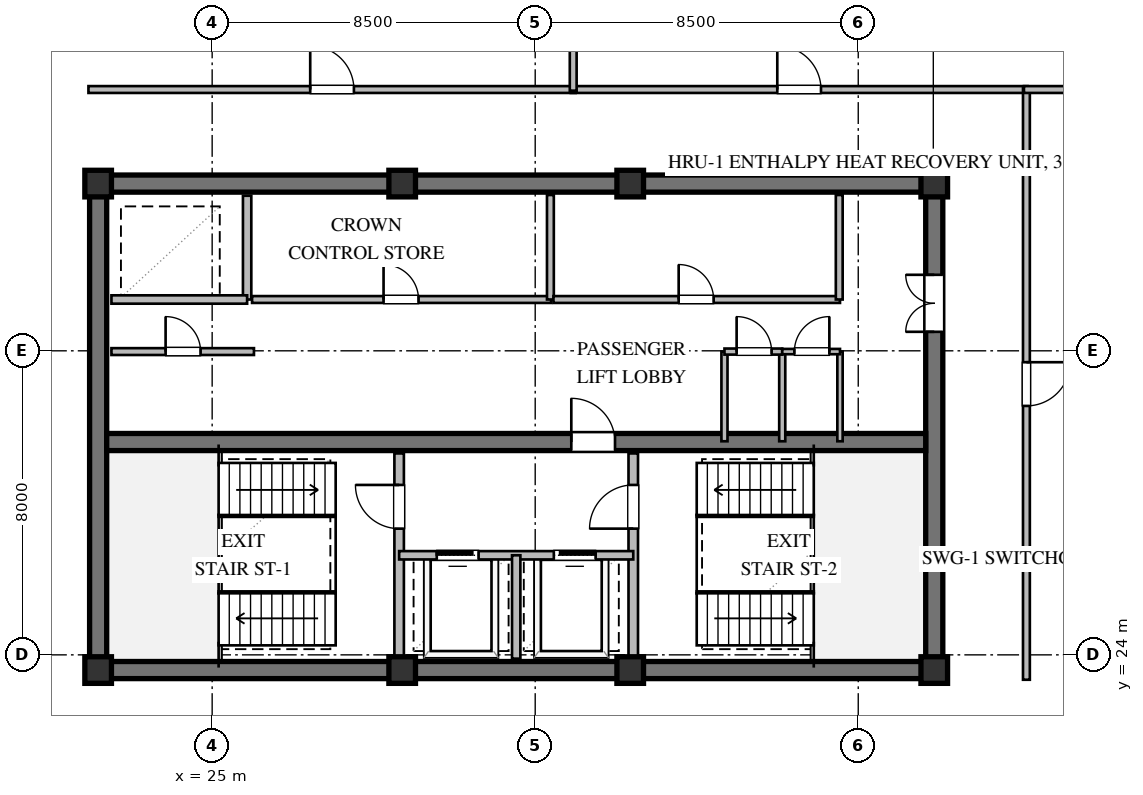
"""IFC4 building model, lengths in metres.
Left out: names, types, materials, properties, quantities, classifications, styles, units other than length and angle.
Written with IfcOpenShell. Run it as: python <this file> out.ifc"""

import sys

from ifc_helpers import new_model, si_unit, direction, frame, frame_2d, origin, origin_2d, place, context, subcontext, project, spatial, rectangle, extrude, element, fill, save


model = new_model("IFC4")
c1 = context("Model", 3, precision=1e-05, world=origin(), true_north=direction((0.0, 1.0)))
c2 = subcontext(c1, "Body", "Model", "MODEL_VIEW")
j1 = project(units=[si_unit("LENGTHUNIT", "METRE"), si_unit("PLANEANGLEUNIT", "RADIAN")], contexts=[c1])
p1 = place(None, origin())
s1 = spatial("IfcSite", under=j1, at=p1, CompositionType="ELEMENT")
p2 = place(p1, origin())
s2 = spatial("IfcBuilding", under=s1, at=p2, CompositionType="ELEMENT")
p3 = place(p2, frame((0.0, 0.0, 296.8)))
s3 = spatial("IfcBuildingStorey", under=s2, at=p3, CompositionType="ELEMENT", Elevation=296.8)
for number, where, z_axis, x_axis in (
    (1, (21.775, 23.6, 0.0), (0.0, 0.0, 1.0), (1.0, 0.0, 0.0)),
    (2, (21.775, 36.4, 0.0), (0.0, 0.0, 1.0), (1.0, 0.0, 0.0)),
):
    element("IfcWall", number, at=place(p3, frame(where, z_axis=z_axis, x_axis=x_axis)), inside=s3, PredefinedType="SHEAR", context=c2, shape_type="SweptSolid", body=[
        extrude(rectangle(XDim=22.45, YDim=0.45, at=frame_2d((11.225, 0.0))), origin(), (0.0, 0.0, 1.0), 3.72),
    ])
p4 = place(p3, frame((22.0, 23.825, 0.0), z_axis=(0.0, 0.0, 1.0), x_axis=(0.0, 1.0, 0.0)))
e3 = element("IfcWall", 3, at=p4, inside=s3, PredefinedType="SHEAR", context=c2, shape_type="SweptSolid", body=[
    extrude(rectangle(XDim=12.35, YDim=0.45, at=frame_2d((6.175, 0.0))), origin(), (0.0, 0.0, 1.0), 3.72),
])
p5 = place(p3, frame((44.0, 23.825, 0.0), z_axis=(0.0, 0.0, 1.0), x_axis=(0.0, 1.0, 0.0)))
e4 = element("IfcWall", 4, at=p5, inside=s3, PredefinedType="SHEAR", context=c2, shape_type="SweptSolid", body=[
    extrude(rectangle(XDim=12.35, YDim=0.45, at=frame_2d((6.175, 0.0))), origin(), (0.0, 0.0, 1.0), 3.72),
])
p6 = place(p5, frame((8.675, 0.0, 0.0)))
e5 = element("IfcOpeningElement", 5, at=p6, cuts=e4, PredefinedType="OPENING", context=c2, shape_type="SweptSolid", body=[
    extrude(rectangle(XDim=1.5, YDim=2.15, at=frame_2d((0.75, 1.075))), frame((0.0, 0.235, 0.0), z_axis=(0.0, -1.0, 0.0), x_axis=(1.0, 0.0, 0.0)), (0.0, 0.0, 1.0), 0.47),
])
p7 = place(p3, frame((22.225, 29.6, 0.0), z_axis=(0.0, 0.0, 1.0), x_axis=(1.0, 0.0, 0.0)))
e6 = element("IfcWall", 6, at=p7, inside=s3, PredefinedType="SHEAR", context=c2, shape_type="SweptSolid", body=[
    extrude(rectangle(XDim=21.55, YDim=0.45, at=frame_2d((10.775, 0.0))), origin(), (0.0, 0.0, 1.0), 3.72),
])
p8 = place(p7, frame((12.225, 0.0, 0.0)))
e7 = element("IfcOpeningElement", 7, at=p8, cuts=e6, PredefinedType="OPENING", context=c2, shape_type="SweptSolid", body=[
    extrude(rectangle(XDim=1.15, YDim=2.1, at=frame_2d((0.575, 1.05))), frame((0.0, 0.235, 0.0), z_axis=(0.0, -1.0, 0.0), x_axis=(1.0, 0.0, 0.0)), (0.0, 0.0, 1.0), 0.47),
])
for number, where, z_axis, x_axis in (
    (8, (22.0, 23.6, 0.0), (0.0, 0.0, 1.0), (1.0, 0.0, 0.0)),
    (9, (30.0, 23.6, 0.0), (0.0, 0.0, 1.0), (1.0, 0.0, 0.0)),
    (10, (36.0, 23.6, 0.0), (0.0, 0.0, 1.0), (1.0, 0.0, 0.0)),
    (11, (44.0, 23.6, 0.0), (0.0, 0.0, 1.0), (1.0, 0.0, 0.0)),
    (12, (44.0, 36.4, 0.0), (0.0, 0.0, 1.0), (1.0, 0.0, 0.0)),
    (13, (36.0, 36.4, 0.0), (0.0, 0.0, 1.0), (1.0, 0.0, 0.0)),
    (14, (30.0, 36.4, 0.0), (0.0, 0.0, 1.0), (1.0, 0.0, 0.0)),
    (15, (22.0, 36.4, 0.0), (0.0, 0.0, 1.0), (1.0, 0.0, 0.0)),
):
    element("IfcColumn", number, at=place(p3, frame(where, z_axis=z_axis, x_axis=x_axis)), inside=s3, PredefinedType="COLUMN", context=c2, shape_type="SweptSolid", body=[
        extrude(rectangle(XDim=0.7, YDim=0.7, at=origin_2d()), origin(), (0.0, 0.0, 1.0), 4.0),
    ])
p9 = place(p3, frame((56.357, 23.077, 0.0), z_axis=(0.0, 0.0, 1.0), x_axis=(-0.814111303181, -0.580708865123, 0.0)))
e16 = element("IfcWall", 16, at=p9, inside=s3, PredefinedType="STANDARD", context=c2, shape_type="SweptSolid", body=[
    extrude(rectangle(XDim=12.481, YDim=0.3, at=frame_2d((6.24, 0.0))), origin(), (0.0, 0.0, 1.0), 3.72),
])
p10 = place(p3, frame((29.92, 23.9, 0.0), z_axis=(0.0, 0.0, 1.0), x_axis=(0.0, 1.0, 0.0)))
e17 = element("IfcWall", 17, at=p10, inside=s3, PredefinedType="SOLIDWALL", context=c2, shape_type="SweptSolid", body=[
    extrude(rectangle(XDim=5.4, YDim=0.25, at=frame_2d((2.7, 0.0))), origin(), (0.0, 0.0, 1.0), 3.72),
])
p11 = place(p10, frame((3.421, 0.0, 0.0)))
e18 = element("IfcOpeningElement", 18, at=p11, cuts=e17, PredefinedType="OPENING", context=c2, shape_type="SweptSolid", body=[
    extrude(rectangle(XDim=1.15, YDim=2.1, at=frame_2d((0.575, 1.05))), frame((0.0, 0.135, 0.0), z_axis=(0.0, -1.0, 0.0), x_axis=(1.0, 0.0, 0.0)), (0.0, 0.0, 1.0), 0.27),
])
p12 = place(p3, frame((36.08, 23.9, 0.0), z_axis=(0.0, 0.0, 1.0), x_axis=(0.0, 1.0, 0.0)))
e19 = element("IfcWall", 19, at=p12, inside=s3, PredefinedType="SOLIDWALL", context=c2, shape_type="SweptSolid", body=[
    extrude(rectangle(XDim=5.4, YDim=0.25, at=frame_2d((2.7, 0.0))), origin(), (0.0, 0.0, 1.0), 3.72),
])
p13 = place(p12, frame((3.421, 0.0, 0.0)))
e20 = element("IfcOpeningElement", 20, at=p13, cuts=e19, PredefinedType="OPENING", context=c2, shape_type="SweptSolid", body=[
    extrude(rectangle(XDim=1.15, YDim=2.1, at=frame_2d((0.575, 1.05))), frame((0.0, 0.135, 0.0), z_axis=(0.0, -1.0, 0.0), x_axis=(1.0, 0.0, 0.0)), (0.0, 0.0, 1.0), 0.27),
])
p14 = place(p3, frame((29.92, 26.62, 0.0), z_axis=(0.0, 0.0, 1.0), x_axis=(1.0, 0.0, 0.0)))
e21 = element("IfcWall", 21, at=p14, inside=s3, PredefinedType="SOLIDWALL", context=c2, shape_type="SweptSolid", body=[
    extrude(rectangle(XDim=6.16, YDim=0.22, at=frame_2d((3.08, 0.0))), origin(), (0.0, 0.0, 1.0), 3.72),
])
p15 = place(p14, frame((0.99, 0.0, 0.0)))
e22 = element("IfcOpeningElement", 22, at=p15, cuts=e21, PredefinedType="OPENING", context=c2, shape_type="SweptSolid", body=[
    extrude(rectangle(XDim=1.1, YDim=2.1, at=frame_2d((0.55, 1.05))), frame((0.0, 0.12, 0.0), z_axis=(0.0, -1.0, 0.0), x_axis=(1.0, 0.0, 0.0)), (0.0, 0.0, 1.0), 0.24),
])
p16 = place(p14, frame((4.07, 0.0, 0.0)))
e23 = element("IfcOpeningElement", 23, at=p16, cuts=e21, PredefinedType="OPENING", context=c2, shape_type="SweptSolid", body=[
    extrude(rectangle(XDim=1.1, YDim=2.1, at=frame_2d((0.55, 1.05))), frame((0.0, 0.12, 0.0), z_axis=(0.0, -1.0, 0.0), x_axis=(1.0, 0.0, 0.0)), (0.0, 0.0, 1.0), 0.24),
])
p17 = place(p3, frame((33.0, 23.9, 0.0), z_axis=(0.0, 0.0, 1.0), x_axis=(0.0, 1.0, 0.0)))
e24 = element("IfcWall", 24, at=p17, inside=s3, PredefinedType="SOLIDWALL", context=c2, shape_type="SweptSolid", body=[
    extrude(rectangle(XDim=2.72, YDim=0.22, at=frame_2d((1.36, 0.0))), origin(), (0.0, 0.0, 1.0), 3.72),
])
p18 = place(p3, frame((25.92, 33.35, 0.0), z_axis=(0.0, 0.0, 1.0), x_axis=(0.0, 1.0, 0.0)))
e25 = element("IfcWall", 25, at=p18, inside=s3, PredefinedType="SOLIDWALL", context=c2, shape_type="SweptSolid", body=[
    extrude(rectangle(XDim=2.73, YDim=0.22, at=frame_2d((1.365, 0.0))), origin(), (0.0, 0.0, 1.0), 3.72),
])
p19 = place(p3, frame((22.35, 33.35, 0.0), z_axis=(0.0, 0.0, 1.0), x_axis=(1.0, 0.0, 0.0)))
e26 = element("IfcWall", 26, at=p19, inside=s3, PredefinedType="SOLIDWALL", context=c2, shape_type="SweptSolid", body=[
    extrude(rectangle(XDim=3.57, YDim=0.22, at=frame_2d((1.785, 0.0))), origin(), (0.0, 0.0, 1.0), 3.72),
])
p20 = place(p3, frame((26.05, 33.35, 0.0), z_axis=(0.0, 0.0, 1.0), x_axis=(1.0, 0.0, 0.0)))
e27 = element("IfcWall", 27, at=p20, inside=s3, PredefinedType="PARTITIONING", context=c2, shape_type="SweptSolid", body=[
    extrude(rectangle(XDim=7.87, YDim=0.18, at=frame_2d((3.935, 0.0))), origin(), (0.0, 0.0, 1.0), 3.72),
])
p21 = place(p20, frame((3.46, 0.0, 0.0)))
e28 = element("IfcOpeningElement", 28, at=p21, cuts=e27, PredefinedType="OPENING", context=c2, shape_type="SweptSolid", body=[
    extrude(rectangle(XDim=0.92, YDim=2.1, at=frame_2d((0.46, 1.05))), frame((0.0, 0.1, 0.0), z_axis=(0.0, -1.0, 0.0), x_axis=(1.0, 0.0, 0.0)), (0.0, 0.0, 1.0), 0.2),
])
p22 = place(p3, frame((33.9, 33.35, 0.0), z_axis=(0.0, 0.0, 1.0), x_axis=(0.0, 1.0, 0.0)))
e29 = element("IfcWall", 29, at=p22, inside=s3, PredefinedType="PARTITIONING", context=c2, shape_type="SweptSolid", body=[
    extrude(rectangle(XDim=2.75, YDim=0.18, at=frame_2d((1.375, 0.0))), origin(), (0.0, 0.0, 1.0), 3.72),
])
p23 = place(p3, frame((33.98, 33.35, 0.0), z_axis=(0.0, 0.0, 1.0), x_axis=(1.0, 0.0, 0.0)))
e30 = element("IfcWall", 30, at=p23, inside=s3, PredefinedType="PARTITIONING", context=c2, shape_type="SweptSolid", body=[
    extrude(rectangle(XDim=7.54, YDim=0.18, at=frame_2d((3.77, 0.0))), origin(), (0.0, 0.0, 1.0), 3.72),
])
p24 = place(p23, frame((3.295, 0.0, 0.0)))
e31 = element("IfcOpeningElement", 31, at=p24, cuts=e30, PredefinedType="OPENING", context=c2, shape_type="SweptSolid", body=[
    extrude(rectangle(XDim=0.92, YDim=2.1, at=frame_2d((0.46, 1.05))), frame((0.0, 0.1, 0.0), z_axis=(0.0, -1.0, 0.0), x_axis=(1.0, 0.0, 0.0)), (0.0, 0.0, 1.0), 0.2),
])
p25 = place(p3, frame((41.5, 33.35, 0.0), z_axis=(0.0, 0.0, 1.0), x_axis=(0.0, 1.0, 0.0)))
e32 = element("IfcWall", 32, at=p25, inside=s3, PredefinedType="PARTITIONING", context=c2, shape_type="SweptSolid", body=[
    extrude(rectangle(XDim=2.75, YDim=0.18, at=frame_2d((1.375, 0.0))), origin(), (0.0, 0.0, 1.0), 3.72),
])
p26 = place(p3, frame((22.35, 31.98, 0.0), z_axis=(0.0, 0.0, 1.0), x_axis=(1.0, 0.0, 0.0)))
e33 = element("IfcWall", 33, at=p26, inside=s3, PredefinedType="PARTITIONING", context=c2, shape_type="SweptSolid", body=[
    extrude(rectangle(XDim=3.75, YDim=0.18, at=frame_2d((1.875, 0.0))), origin(), (0.0, 0.0, 1.0), 3.72),
])
p27 = place(p26, frame((1.425, 0.0, 0.0)))
e34 = element("IfcOpeningElement", 34, at=p27, cuts=e33, PredefinedType="OPENING", context=c2, shape_type="SweptSolid", body=[
    extrude(rectangle(XDim=0.92, YDim=2.1, at=frame_2d((0.46, 1.05))), frame((0.0, 0.1, 0.0), z_axis=(0.0, -1.0, 0.0), x_axis=(1.0, 0.0, 0.0)), (0.0, 0.0, 1.0), 0.2),
])
for number, where, z_axis, x_axis in (
    (35, (38.48, 29.62, 0.0), (0.0, 0.0, 1.0), (0.0, 1.0, 0.0)),
    (36, (40.0, 29.62, 0.0), (0.0, 0.0, 1.0), (0.0, 1.0, 0.0)),
):
    element("IfcWall", number, at=place(p3, frame(where, z_axis=z_axis, x_axis=x_axis)), inside=s3, PredefinedType="PLUMBINGWALL", context=c2, shape_type="SweptSolid", body=[
        extrude(rectangle(XDim=2.36, YDim=0.16, at=frame_2d((1.18, 0.0))), origin(), (0.0, 0.0, 1.0), 3.72),
    ])
p28 = place(p3, frame((41.52, 29.62, 0.0), z_axis=(0.0, 0.0, 1.0), x_axis=(0.0, 1.0, 0.0)))
e37 = element("IfcWall", 37, at=p28, inside=s3, PredefinedType="PARTITIONING", context=c2, shape_type="SweptSolid", body=[
    extrude(rectangle(XDim=2.36, YDim=0.14, at=frame_2d((1.18, 0.0))), origin(), (0.0, 0.0, 1.0), 3.72),
])
p29 = place(p3, frame((38.48, 31.98, 0.0), z_axis=(0.0, 0.0, 1.0), x_axis=(1.0, 0.0, 0.0)))
e38 = element("IfcWall", 38, at=p29, inside=s3, PredefinedType="PLUMBINGWALL", context=c2, shape_type="SweptSolid", body=[
    extrude(rectangle(XDim=1.52, YDim=0.16, at=frame_2d((0.76, 0.0))), origin(), (0.0, 0.0, 1.0), 3.72),
])
p30 = place(p29, frame((0.32, 0.0, 0.0)))
e39 = element("IfcOpeningElement", 39, at=p30, cuts=e38, PredefinedType="OPENING", context=c2, shape_type="SweptSolid", body=[
    extrude(rectangle(XDim=0.92, YDim=2.1, at=frame_2d((0.46, 1.05))), frame((0.0, 0.09, 0.0), z_axis=(0.0, -1.0, 0.0), x_axis=(1.0, 0.0, 0.0)), (0.0, 0.0, 1.0), 0.18),
])
p31 = place(p3, frame((40.0, 31.98, 0.0), z_axis=(0.0, 0.0, 1.0), x_axis=(1.0, 0.0, 0.0)))
e40 = element("IfcWall", 40, at=p31, inside=s3, PredefinedType="PARTITIONING", context=c2, shape_type="SweptSolid", body=[
    extrude(rectangle(XDim=1.52, YDim=0.14, at=frame_2d((0.76, 0.0))), origin(), (0.0, 0.0, 1.0), 3.72),
])
p32 = place(p31, frame((0.32, 0.0, 0.0)))
e41 = element("IfcOpeningElement", 41, at=p32, cuts=e40, PredefinedType="OPENING", context=c2, shape_type="SweptSolid", body=[
    extrude(rectangle(XDim=0.92, YDim=2.1, at=frame_2d((0.46, 1.05))), frame((0.0, 0.08, 0.0), z_axis=(0.0, -1.0, 0.0), x_axis=(1.0, 0.0, 0.0)), (0.0, 0.0, 1.0), 0.16),
])
p33 = place(p3, frame((21.745, 38.875, 0.0), z_axis=(0.0, 0.0, 1.0), x_axis=(1.0, 0.0, 0.0)))
e42 = element("IfcWall", 42, at=p33, inside=s3, PredefinedType="PARTITIONING", context=c2, shape_type="SweptSolid", body=[
    extrude(rectangle(XDim=12.82, YDim=0.18, at=frame_2d((6.41, 0.0))), origin(), (0.0, 0.0, 1.0), 3.72),
])
p34 = place(p33, frame((5.835, 0.0, 0.0)))
e43 = element("IfcOpeningElement", 43, at=p34, cuts=e42, PredefinedType="OPENING", context=c2, shape_type="SweptSolid", body=[
    extrude(rectangle(XDim=1.15, YDim=2.1, at=frame_2d((0.575, 1.05))), frame((0.0, 0.1, 0.0), z_axis=(0.0, -1.0, 0.0), x_axis=(1.0, 0.0, 0.0)), (0.0, 0.0, 1.0), 0.2),
])
p35 = place(p3, frame((34.435, 38.875, 0.0), z_axis=(0.0, 0.0, 1.0), x_axis=(1.0, 0.0, 0.0)))
e44 = element("IfcWall", 44, at=p35, inside=s3, PredefinedType="PARTITIONING", context=c2, shape_type="SweptSolid", body=[
    extrude(rectangle(XDim=12.02, YDim=0.18, at=frame_2d((6.01, 0.0))), origin(), (0.0, 0.0, 1.0), 3.72),
])
p36 = place(p35, frame((5.435, 0.0, 0.0)))
e45 = element("IfcOpeningElement", 45, at=p36, cuts=e44, PredefinedType="OPENING", context=c2, shape_type="SweptSolid", body=[
    extrude(rectangle(XDim=1.15, YDim=2.1, at=frame_2d((0.575, 1.05))), frame((0.0, 0.1, 0.0), z_axis=(0.0, -1.0, 0.0), x_axis=(1.0, 0.0, 0.0)), (0.0, 0.0, 1.0), 0.2),
])
p37 = place(p3, frame((46.425, 38.905, 0.0), z_axis=(0.0, 0.0, 1.0), x_axis=(0.0, -1.0, 0.0)))
e46 = element("IfcWall", 46, at=p37, inside=s3, PredefinedType="PARTITIONING", context=c2, shape_type="SweptSolid", body=[
    extrude(rectangle(XDim=15.56, YDim=0.18, at=frame_2d((7.78, 0.0))), origin(), (0.0, 0.0, 1.0), 3.72),
])
p38 = place(p37, frame((7.205, 0.0, 0.0)))
e47 = element("IfcOpeningElement", 47, at=p38, cuts=e46, PredefinedType="OPENING", context=c2, shape_type="SweptSolid", body=[
    extrude(rectangle(XDim=1.15, YDim=2.1, at=frame_2d((0.575, 1.05))), frame((0.0, 0.1, 0.0), z_axis=(0.0, -1.0, 0.0), x_axis=(1.0, 0.0, 0.0)), (0.0, 0.0, 1.0), 0.2),
])
p39 = place(p3, frame((34.5, 53.455, 0.0), z_axis=(0.0, 0.0, 1.0), x_axis=(0.0, -1.0, 0.0)))
e48 = element("IfcWall", 48, at=p39, inside=s3, PredefinedType="PARTITIONING", context=c2, shape_type="SweptSolid", body=[
    extrude(rectangle(XDim=14.61, YDim=0.18, at=frame_2d((7.305, 0.0))), origin(), (0.0, 0.0, 1.0), 3.72),
])
p40 = place(p3, frame((59.517, 38.875, 0.0), z_axis=(0.0, 0.0, 1.0), x_axis=(-1.0, 0.0, 0.0)))
e49 = element("IfcWall", 49, at=p40, inside=s3, PredefinedType="PARTITIONING", context=c2, shape_type="SweptSolid", body=[
    extrude(rectangle(XDim=13.157, YDim=0.18, at=frame_2d((6.579, 0.0))), origin(), (0.0, 0.0, 1.0), 3.72),
])
p41 = place(p11, origin())
e50 = element("IfcDoor", 50, at=p41, inside=s3, OperationType="SINGLE_SWING_RIGHT", PredefinedType="DOOR", context=c2, shape_type="SweptSolid", body=[
    extrude(rectangle(XDim=1.15, YDim=2.1, at=frame_2d((0.575, 1.05))), frame((0.0, 0.025, 0.0), z_axis=(0.0, -1.0, 0.0), x_axis=(1.0, 0.0, 0.0)), (0.0, 0.0, 1.0), 0.05),
])
fill(e18, e50)
p42 = place(p13, origin())
e51 = element("IfcDoor", 51, at=p42, inside=s3, OperationType="SINGLE_SWING_LEFT", PredefinedType="DOOR", context=c2, shape_type="SweptSolid", body=[
    extrude(rectangle(XDim=1.15, YDim=2.1, at=frame_2d((0.575, 1.05))), frame((0.0, 0.025, 0.0), z_axis=(0.0, -1.0, 0.0), x_axis=(1.0, 0.0, 0.0)), (0.0, 0.0, 1.0), 0.05),
])
fill(e20, e51)
p43 = place(p15, origin())
e52 = element("IfcDoor", 52, at=p43, inside=s3, OperationType="SLIDING_TO_LEFT", PredefinedType="DOOR", context=c2, shape_type="SweptSolid", body=[
    extrude(rectangle(XDim=1.1, YDim=2.1, at=frame_2d((0.55, 1.05))), frame((0.0, 0.025, 0.0), z_axis=(0.0, -1.0, 0.0), x_axis=(1.0, 0.0, 0.0)), (0.0, 0.0, 1.0), 0.05),
])
fill(e22, e52)
p44 = place(p16, origin())
e53 = element("IfcDoor", 53, at=p44, inside=s3, OperationType="SLIDING_TO_RIGHT", PredefinedType="DOOR", context=c2, shape_type="SweptSolid", body=[
    extrude(rectangle(XDim=1.1, YDim=2.1, at=frame_2d((0.55, 1.05))), frame((0.0, 0.025, 0.0), z_axis=(0.0, -1.0, 0.0), x_axis=(1.0, 0.0, 0.0)), (0.0, 0.0, 1.0), 0.05),
])
fill(e23, e53)
p45 = place(p8, origin())
e54 = element("IfcDoor", 54, at=p45, inside=s3, OperationType="SINGLE_SWING_LEFT", PredefinedType="DOOR", context=c2, shape_type="SweptSolid", body=[
    extrude(rectangle(XDim=1.15, YDim=2.1, at=frame_2d((0.575, 1.05))), frame((0.0, 0.025, 0.0), z_axis=(0.0, -1.0, 0.0), x_axis=(1.0, 0.0, 0.0)), (0.0, 0.0, 1.0), 0.05),
])
fill(e7, e54)
p46 = place(p6, origin())
e55 = element("IfcDoor", 55, at=p46, inside=s3, OperationType="DOUBLE_DOOR_SINGLE_SWING", PredefinedType="DOOR", context=c2, shape_type="SweptSolid", body=[
    extrude(rectangle(XDim=1.5, YDim=2.15, at=frame_2d((0.75, 1.075))), frame((0.0, 0.025, 0.0), z_axis=(0.0, -1.0, 0.0), x_axis=(1.0, 0.0, 0.0)), (0.0, 0.0, 1.0), 0.05),
])
fill(e5, e55)
p47 = place(p21, origin())
e56 = element("IfcDoor", 56, at=p47, inside=s3, OperationType="SINGLE_SWING_LEFT", PredefinedType="DOOR", context=c2, shape_type="SweptSolid", body=[
    extrude(rectangle(XDim=0.92, YDim=2.1, at=frame_2d((0.46, 1.05))), frame((0.0, 0.025, 0.0), z_axis=(0.0, -1.0, 0.0), x_axis=(1.0, 0.0, 0.0)), (0.0, 0.0, 1.0), 0.05),
])
fill(e28, e56)
p48 = place(p24, origin())
e57 = element("IfcDoor", 57, at=p48, inside=s3, OperationType="SINGLE_SWING_LEFT", PredefinedType="DOOR", context=c2, shape_type="SweptSolid", body=[
    extrude(rectangle(XDim=0.92, YDim=2.1, at=frame_2d((0.46, 1.05))), frame((0.0, 0.025, 0.0), z_axis=(0.0, -1.0, 0.0), x_axis=(1.0, 0.0, 0.0)), (0.0, 0.0, 1.0), 0.05),
])
fill(e31, e57)
p49 = place(p27, origin())
e58 = element("IfcDoor", 58, at=p49, inside=s3, OperationType="SINGLE_SWING_LEFT", PredefinedType="DOOR", context=c2, shape_type="SweptSolid", body=[
    extrude(rectangle(XDim=0.92, YDim=2.1, at=frame_2d((0.46, 1.05))), frame((0.0, 0.025, 0.0), z_axis=(0.0, -1.0, 0.0), x_axis=(1.0, 0.0, 0.0)), (0.0, 0.0, 1.0), 0.05),
])
fill(e34, e58)
p50 = place(p30, origin())
e59 = element("IfcDoor", 59, at=p50, inside=s3, OperationType="SINGLE_SWING_LEFT", PredefinedType="DOOR", context=c2, shape_type="SweptSolid", body=[
    extrude(rectangle(XDim=0.92, YDim=2.1, at=frame_2d((0.46, 1.05))), frame((0.0, 0.025, 0.0), z_axis=(0.0, -1.0, 0.0), x_axis=(1.0, 0.0, 0.0)), (0.0, 0.0, 1.0), 0.05),
])
fill(e39, e59)
p51 = place(p32, origin())
e60 = element("IfcDoor", 60, at=p51, inside=s3, OperationType="SINGLE_SWING_RIGHT", PredefinedType="DOOR", context=c2, shape_type="SweptSolid", body=[
    extrude(rectangle(XDim=0.92, YDim=2.1, at=frame_2d((0.46, 1.05))), frame((0.0, 0.025, 0.0), z_axis=(0.0, -1.0, 0.0), x_axis=(1.0, 0.0, 0.0)), (0.0, 0.0, 1.0), 0.05),
])
fill(e41, e60)
p52 = place(p34, origin())
e61 = element("IfcDoor", 61, at=p52, inside=s3, OperationType="SINGLE_SWING_LEFT", PredefinedType="DOOR", context=c2, shape_type="SweptSolid", body=[
    extrude(rectangle(XDim=1.15, YDim=2.1, at=frame_2d((0.575, 1.05))), frame((0.0, 0.025, 0.0), z_axis=(0.0, -1.0, 0.0), x_axis=(1.0, 0.0, 0.0)), (0.0, 0.0, 1.0), 0.05),
])
fill(e43, e61)
p53 = place(p36, origin())
e62 = element("IfcDoor", 62, at=p53, inside=s3, OperationType="SINGLE_SWING_LEFT", PredefinedType="DOOR", context=c2, shape_type="SweptSolid", body=[
    extrude(rectangle(XDim=1.15, YDim=2.1, at=frame_2d((0.575, 1.05))), frame((0.0, 0.025, 0.0), z_axis=(0.0, -1.0, 0.0), x_axis=(1.0, 0.0, 0.0)), (0.0, 0.0, 1.0), 0.05),
])
fill(e45, e62)
p54 = place(p38, origin())
e63 = element("IfcDoor", 63, at=p54, inside=s3, OperationType="SINGLE_SWING_LEFT", PredefinedType="DOOR", context=c2, shape_type="SweptSolid", body=[
    extrude(rectangle(XDim=1.15, YDim=2.1, at=frame_2d((0.575, 1.05))), frame((0.0, 0.025, 0.0), z_axis=(0.0, -1.0, 0.0), x_axis=(1.0, 0.0, 0.0)), (0.0, 0.0, 1.0), 0.05),
])
fill(e47, e63)
save(model, sys.argv[1])
